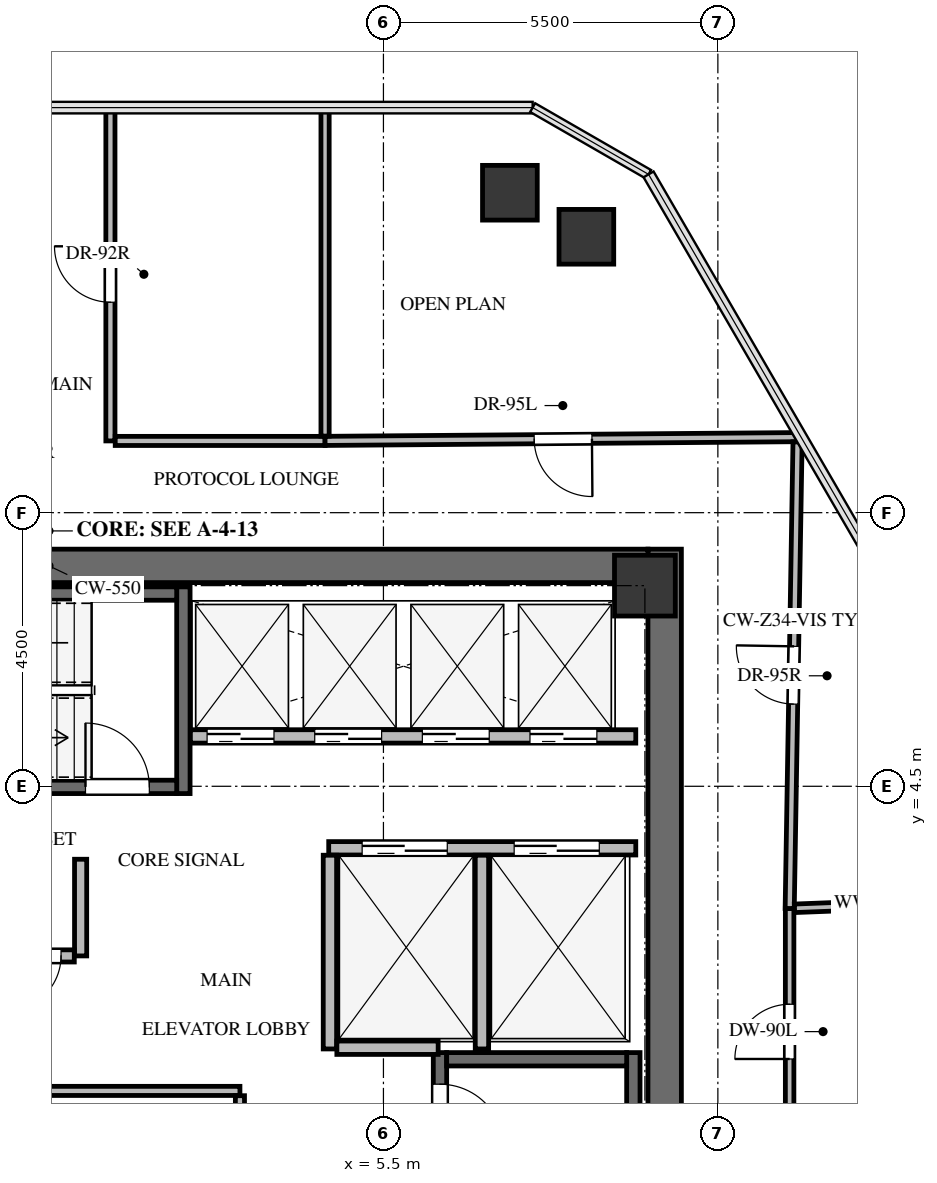
"""IFC4 building model, lengths in metres.
Left out: names, types, materials, properties, quantities, classifications, styles, units other than length and angle.
Written with IfcOpenShell. Run it as: python <this file> out.ifc"""

import sys

from ifc_helpers import new_model, si_unit, direction, frame, frame_2d, origin, origin_2d, place, context, subcontext, project, spatial, rectangle, extrude, source, transform, mapped, element, fill, save


model = new_model("IFC4")
c1 = context("Model", 3, precision=1e-05, world=origin(), true_north=direction((0.0, 1.0)))
c2 = subcontext(c1, "Body", "Model", "MODEL_VIEW")
j1 = project(units=[si_unit("LENGTHUNIT", "METRE"), si_unit("PLANEANGLEUNIT", "RADIAN")], contexts=[c1])
p1 = place(None, origin())
s1 = spatial("IfcSite", under=j1, at=p1, CompositionType="ELEMENT")
p2 = place(p1, origin())
s2 = spatial("IfcBuilding", under=s1, at=p2, CompositionType="ELEMENT")
p3 = place(p2, frame((0.0, 0.0, 234.8)))
s3 = spatial("IfcBuildingStorey", under=s2, at=p3, CompositionType="ELEMENT", Elevation=234.8)
p4 = place(p3, frame((10.125, -8.4, 0.0), z_axis=(0.0, 0.0, 1.0), x_axis=(0.0, 1.0, 0.0)))
e1 = element("IfcWall", 1, at=p4, inside=s3, PredefinedType="SHEAR", context=c2, shape_type="SweptSolid", body=[
    extrude(rectangle(XDim=16.8, YDim=0.55, at=frame_2d((8.4, 0.0))), origin(), (0.0, 0.0, 1.0), 3.3),
])
p5 = place(p3, frame((-9.85, 8.125, 0.0), z_axis=(0.0, 0.0, 1.0), x_axis=(1.0, 0.0, 0.0)))
e2 = element("IfcWall", 2, at=p5, inside=s3, PredefinedType="SHEAR", context=c2, shape_type="SweptSolid", body=[
    extrude(rectangle(XDim=19.7, YDim=0.55, at=frame_2d((9.85, 0.0))), origin(), (0.0, 0.0, 1.0), 3.3),
])
p6 = place(p3, frame((9.61, -7.77, -0.24), z_axis=(0.0, 0.0, 1.0), x_axis=(0.0, 1.0, 0.0)))
e3 = element("IfcWall", 3, at=p6, inside=s3, PredefinedType="SHEAR", context=c2, shape_type="SweptSolid", body=[
    extrude(rectangle(XDim=7.89, YDim=0.22, at=frame_2d((3.945, 0.0))), origin(), (0.0, 0.0, 1.0), 3.3),
])
p7 = place(p3, frame((6.43, 0.12, -0.24), z_axis=(0.0, 0.0, 1.0), x_axis=(0.0, -1.0, 0.0)))
e4 = element("IfcWall", 4, at=p7, inside=s3, PredefinedType="SHEAR", context=c2, shape_type="SweptSolid", body=[
    extrude(rectangle(XDim=7.89, YDim=0.22, at=frame_2d((3.945, 0.0))), origin(), (0.0, 0.0, 1.0), 3.3),
])
p8 = place(p7, frame((0.52, 0.0, 0.0)))
e5 = element("IfcOpeningElement", 5, at=p8, cuts=e4, PredefinedType="OPENING", context=c2, shape_type="SweptSolid", body=[
    extrude(rectangle(XDim=1.05, YDim=2.15, at=frame_2d((0.525, 1.075))), frame((0.0, 0.12, 0.0), z_axis=(0.0, -1.0, 0.0), x_axis=(1.0, 0.0, 0.0)), (0.0, 0.0, 1.0), 0.24),
])
p9 = place(p3, frame((9.5, 0.01, -0.24), z_axis=(0.0, 0.0, 1.0), x_axis=(-1.0, 0.0, 0.0)))
e6 = element("IfcWall", 6, at=p9, inside=s3, PredefinedType="SHEAR", context=c2, shape_type="SweptSolid", body=[
    extrude(rectangle(XDim=2.96, YDim=0.22, at=frame_2d((1.48, 0.0))), origin(), (0.0, 0.0, 1.0), 3.3),
])
p10 = place(p3, frame((2.21, 4.38, -0.24), z_axis=(0.0, 0.0, 1.0), x_axis=(0.0, 1.0, 0.0)))
e7 = element("IfcWall", 7, at=p10, inside=s3, PredefinedType="SHEAR", context=c2, shape_type="SweptSolid", body=[
    extrude(rectangle(XDim=3.4, YDim=0.22, at=frame_2d((1.7, 0.0))), origin(), (0.0, 0.0, 1.0), 3.3),
])
p11 = place(p3, frame((-5.25, 4.49, -0.24), z_axis=(0.0, 0.0, 1.0), x_axis=(1.0, 0.0, 0.0)))
e8 = element("IfcWall", 8, at=p11, inside=s3, PredefinedType="SHEAR", context=c2, shape_type="SweptSolid", body=[
    extrude(rectangle(XDim=7.35, YDim=0.22, at=frame_2d((3.675, 0.0))), origin(), (0.0, 0.0, 1.0), 3.3),
])
p12 = place(p11, frame((5.85, 0.0, 0.0)))
e9 = element("IfcOpeningElement", 9, at=p12, cuts=e8, PredefinedType="OPENING", context=c2, shape_type="SweptSolid", body=[
    extrude(rectangle(XDim=1.05, YDim=2.15, at=frame_2d((0.525, 1.075))), frame((0.0, 0.12, 0.0), z_axis=(0.0, -1.0, 0.0), x_axis=(1.0, 0.0, 0.0)), (0.0, 0.0, 1.0), 0.24),
])
p13 = place(p3, frame((2.1, 7.67, -0.24), z_axis=(0.0, 0.0, 1.0), x_axis=(-1.0, 0.0, 0.0)))
e10 = element("IfcWall", 10, at=p13, inside=s3, PredefinedType="SHEAR", context=c2, shape_type="SweptSolid", body=[
    extrude(rectangle(XDim=7.35, YDim=0.22, at=frame_2d((3.675, 0.0))), origin(), (0.0, 0.0, 1.0), 3.3),
])
m1 = source(origin(), c2, "Body", "SweptSolid", [
    extrude(rectangle(XDim=1.0, YDim=1.0, at=origin_2d()), origin(), (0.0, 0.0, 1.0), 3.3),
])
p14 = place(p3, frame((9.8, 7.8, -0.24), z_axis=(0.0, 0.0, 1.0), x_axis=(1.0, 0.0, 0.0)))
e11 = element("IfcColumn", 11, at=p14, inside=s3, PredefinedType="COLUMN", context=c2, shape_type="MappedRepresentation", body=[
    mapped(m1, transform((0.0, 0.0, 0.0), x_axis=(1.0, 0.0, 0.0), y_axis=(0.0, 1.0, 0.0), z_axis=(0.0, 0.0, 1.0), scale=1.0)),
])
m2 = source(origin(), c2, "Body", "SweptSolid", [
    extrude(rectangle(XDim=0.9, YDim=0.9, at=origin_2d()), origin(), (0.0, 0.0, 1.0), 3.3),
])
for number, where, z_axis, x_axis in (
    (12, (7.58, 14.262, -0.24), (0.0, 0.0, 1.0), (1.0, 0.0, 0.0)),
    (13, (8.837, 13.538, -0.24), (0.0, 0.0, 1.0), (1.0, 0.0, 0.0)),
):
    element("IfcColumn", number, at=place(p3, frame(where, z_axis=z_axis, x_axis=x_axis)), inside=s3, PredefinedType="COLUMN", context=c2, shape_type="MappedRepresentation", body=[
        mapped(m2, transform((0.0, 0.0, 0.0), x_axis=(1.0, 0.0, 0.0), y_axis=(0.0, 1.0, 0.0), z_axis=(0.0, 0.0, 1.0), scale=1.0)),
    ])
p15 = place(p3, frame((4.6, 3.48, 0.0), z_axis=(0.0, 0.0, 1.0), x_axis=(1.0, 0.0, 0.0)))
e14 = element("IfcWall", 14, at=p15, inside=s3, PredefinedType="SOLIDWALL", context=c2, shape_type="SweptSolid", body=[
    extrude(rectangle(XDim=5.05, YDim=0.22, at=frame_2d((2.525, 0.0))), origin(), (0.0, 0.0, 1.0), 3.045),
])
p16 = place(p15, frame((0.55, 0.0, 0.0)))
e15 = element("IfcOpeningElement", 15, at=p16, cuts=e14, PredefinedType="OPENING", context=c2, shape_type="SweptSolid", body=[
    extrude(rectangle(XDim=1.4, YDim=2.15, at=frame_2d((0.7, 1.075))), frame((0.0, 0.12, 0.0), z_axis=(0.0, -1.0, 0.0), x_axis=(1.0, 0.0, 0.0)), (0.0, 0.0, 1.0), 0.24),
])
p17 = place(p15, frame((3.05, 0.0, 0.0)))
e16 = element("IfcOpeningElement", 16, at=p17, cuts=e14, PredefinedType="OPENING", context=c2, shape_type="SweptSolid", body=[
    extrude(rectangle(XDim=1.4, YDim=2.15, at=frame_2d((0.7, 1.075))), frame((0.0, 0.12, 0.0), z_axis=(0.0, -1.0, 0.0), x_axis=(1.0, 0.0, 0.0)), (0.0, 0.0, 1.0), 0.24),
])
for number, where, z_axis, x_axis in (
    (17, (4.62, 0.18, 0.0), (0.0, 0.0, 1.0), (0.0, 1.0, 0.0)),
    (18, (7.12, 0.18, 0.0), (0.0, 0.0, 1.0), (0.0, 1.0, 0.0)),
):
    element("IfcWall", number, at=place(p3, frame(where, z_axis=z_axis, x_axis=x_axis)), inside=s3, PredefinedType="SOLIDWALL", context=c2, shape_type="SweptSolid", body=[
        extrude(rectangle(XDim=3.186, YDim=0.22, at=frame_2d((1.593, 0.0))), origin(), (0.0, 0.0, 1.0), 3.045),
    ])
p18 = place(p3, frame((4.734, 0.2, 0.0), z_axis=(0.0, 0.0, 1.0), x_axis=(1.0, 0.0, 0.0)))
e19 = element("IfcWall", 19, at=p18, inside=s3, PredefinedType="SOLIDWALL", context=c2, shape_type="SweptSolid", body=[
    extrude(rectangle(XDim=1.666, YDim=0.22, at=frame_2d((0.833, 0.0))), origin(), (0.0, 0.0, 1.0), 3.045),
])
p19 = place(p3, frame((2.325, 5.32, 0.0), z_axis=(0.0, 0.0, 1.0), x_axis=(1.0, 0.0, 0.0)))
e20 = element("IfcWall", 20, at=p19, inside=s3, PredefinedType="SOLIDWALL", context=c2, shape_type="SweptSolid", body=[
    extrude(rectangle(XDim=7.325, YDim=0.22, at=frame_2d((3.663, 0.0))), origin(), (0.0, 0.0, 1.0), 3.045),
])
p20 = place(p19, frame((0.275, 0.0, 0.0)))
e21 = element("IfcOpeningElement", 21, at=p20, cuts=e20, PredefinedType="OPENING", context=c2, shape_type="SweptSolid", body=[
    extrude(rectangle(XDim=1.1, YDim=2.15, at=frame_2d((0.55, 1.075))), frame((0.0, 0.12, 0.0), z_axis=(0.0, -1.0, 0.0), x_axis=(1.0, 0.0, 0.0)), (0.0, 0.0, 1.0), 0.24),
])
p21 = place(p19, frame((2.045, 0.0, 0.0)))
e22 = element("IfcOpeningElement", 22, at=p21, cuts=e20, PredefinedType="OPENING", context=c2, shape_type="SweptSolid", body=[
    extrude(rectangle(XDim=1.1, YDim=2.15, at=frame_2d((0.55, 1.075))), frame((0.0, 0.12, 0.0), z_axis=(0.0, -1.0, 0.0), x_axis=(1.0, 0.0, 0.0)), (0.0, 0.0, 1.0), 0.24),
])
p22 = place(p19, frame((3.815, 0.0, 0.0)))
e23 = element("IfcOpeningElement", 23, at=p22, cuts=e20, PredefinedType="OPENING", context=c2, shape_type="SweptSolid", body=[
    extrude(rectangle(XDim=1.1, YDim=2.15, at=frame_2d((0.55, 1.075))), frame((0.0, 0.12, 0.0), z_axis=(0.0, -1.0, 0.0), x_axis=(1.0, 0.0, 0.0)), (0.0, 0.0, 1.0), 0.24),
])
p23 = place(p19, frame((5.585, 0.0, 0.0)))
e24 = element("IfcOpeningElement", 24, at=p23, cuts=e20, PredefinedType="OPENING", context=c2, shape_type="SweptSolid", body=[
    extrude(rectangle(XDim=1.1, YDim=2.15, at=frame_2d((0.55, 1.075))), frame((0.0, 0.12, 0.0), z_axis=(0.0, -1.0, 0.0), x_axis=(1.0, 0.0, 0.0)), (0.0, 0.0, 1.0), 0.24),
])
p24 = place(p3, frame((-0.59, -0.51, 0.0), z_axis=(0.0, 0.0, 1.0), x_axis=(1.0, 0.0, 0.0)))
e25 = element("IfcWall", 25, at=p24, inside=s3, PredefinedType="PARTITIONING", context=c2, shape_type="SweptSolid", body=[
    extrude(rectangle(XDim=3.73, YDim=0.15, at=frame_2d((1.865, 0.0))), origin(), (0.0, 0.0, 1.0), 3.045),
])
p25 = place(p3, frame((3.14, -0.589, 0.0), z_axis=(0.0, 0.0, 1.0), x_axis=(0.0, -1.0, 0.0)))
e26 = element("IfcWall", 26, at=p25, inside=s3, PredefinedType="PARTITIONING", context=c2, shape_type="SweptSolid", body=[
    extrude(rectangle(XDim=2.372, YDim=0.15, at=frame_2d((1.186, 0.0))), origin(), (0.0, 0.0, 1.0), 3.045),
])
p26 = place(p3, frame((0.52, 3.3, 0.0), z_axis=(0.0, 0.0, 1.0), x_axis=(0.0, -1.0, 0.0)))
e27 = element("IfcWall", 27, at=p26, inside=s3, PredefinedType="SOLIDWALL", context=c2, shape_type="SweptSolid", body=[
    extrude(rectangle(XDim=1.59, YDim=0.2, at=frame_2d((0.795, 0.0))), origin(), (0.0, 0.0, 1.0), 3.045),
])
p27 = place(p3, frame((0.416, 1.71, 0.0), z_axis=(0.0, 0.0, 1.0), x_axis=(-1.0, 0.0, 0.0)))
e28 = element("IfcWall", 28, at=p27, inside=s3, PredefinedType="SOLIDWALL", context=c2, shape_type="SweptSolid", body=[
    extrude(rectangle(XDim=1.336, YDim=0.2, at=frame_2d((0.668, 0.0))), origin(), (0.0, 0.0, 1.0), 3.045),
])
p28 = place(p27, frame((0.218, 0.0, 0.0)))
e29 = element("IfcOpeningElement", 29, at=p28, cuts=e28, PredefinedType="OPENING", context=c2, shape_type="SweptSolid", body=[
    extrude(rectangle(XDim=0.9, YDim=2.05, at=frame_2d((0.45, 1.025))), frame((0.0, 0.11, 0.0), z_axis=(0.0, -1.0, 0.0), x_axis=(1.0, 0.0, 0.0)), (0.0, 0.0, 1.0), 0.22),
])
p29 = place(p3, frame((12.18, -1.56, 0.0), z_axis=(0.0, 0.0, 1.0), x_axis=(0.0, 1.0, 0.0)))
e30 = element("IfcWall", 30, at=p29, inside=s3, PredefinedType="PARTITIONING", context=c2, shape_type="SweptSolid", body=[
    extrude(rectangle(XDim=4.05, YDim=0.14, at=frame_2d((2.025, 0.0))), origin(), (0.0, 0.0, 1.0), 2.301),
])
p30 = place(p29, frame((1.575, 0.0, 0.0)))
e31 = element("IfcOpeningElement", 31, at=p30, cuts=e30, PredefinedType="OPENING", context=c2, shape_type="SweptSolid", body=[
    extrude(rectangle(XDim=0.9, YDim=2.05, at=frame_2d((0.45, 1.025))), frame((0.0, 0.08, 0.0), z_axis=(0.0, -1.0, 0.0), x_axis=(1.0, 0.0, 0.0)), (0.0, 0.0, 1.0), 0.16),
])
p31 = place(p3, frame((1.01, 10.18, 0.0), z_axis=(0.0, 0.0, 1.0), x_axis=(0.0, 1.0, 0.0)))
e32 = element("IfcWall", 32, at=p31, inside=s3, PredefinedType="PARTITIONING", context=c2, shape_type="SweptSolid", body=[
    extrude(rectangle(XDim=5.482, YDim=0.15, at=frame_2d((2.741, 0.0))), origin(), (0.0, 0.0, 1.0), 2.399),
])
p32 = place(p31, frame((2.281, 0.0, 0.0)))
e33 = element("IfcOpeningElement", 33, at=p32, cuts=e32, PredefinedType="OPENING", context=c2, shape_type="SweptSolid", body=[
    extrude(rectangle(XDim=0.92, YDim=2.1, at=frame_2d((0.46, 1.05))), frame((0.0, 0.085, 0.0), z_axis=(0.0, -1.0, 0.0), x_axis=(1.0, 0.0, 0.0)), (0.0, 0.0, 1.0), 0.17),
])
p33 = place(p3, frame((4.54, 10.18, 0.0), z_axis=(0.0, 0.0, 1.0), x_axis=(-1.0, 0.0, 0.0)))
e34 = element("IfcWall", 34, at=p33, inside=s3, PredefinedType="PARTITIONING", context=c2, shape_type="SweptSolid", body=[
    extrude(rectangle(XDim=3.451, YDim=0.15, at=frame_2d((1.726, 0.0))), origin(), (0.0, 0.0, 1.0), 3.045),
])
p34 = place(p3, frame((12.368, 10.243, 0.0), z_axis=(0.0, 0.0, 1.0), x_axis=(-0.999968379606, -0.007952344825, 0.0)))
e35 = element("IfcWall", 35, at=p34, inside=s3, PredefinedType="PARTITIONING", context=c2, shape_type="SweptSolid", body=[
    extrude(rectangle(XDim=7.829, YDim=0.15, at=frame_2d((3.914, 0.0))), origin(), (0.0, 0.0, 1.0), 2.301),
])
p35 = place(p34, frame((3.439, 0.0, 0.0)))
e36 = element("IfcOpeningElement", 36, at=p35, cuts=e35, PredefinedType="OPENING", context=c2, shape_type="SweptSolid", body=[
    extrude(rectangle(XDim=0.95, YDim=2.1, at=frame_2d((0.475, 1.05))), frame((0.0, 0.085, 0.0), z_axis=(0.0, -1.0, 0.0), x_axis=(1.0, 0.0, 0.0)), (0.0, 0.0, 1.0), 0.17),
])
p36 = place(p3, frame((12.181, 2.49, 0.0), z_axis=(0.0, 0.0, 1.0), x_axis=(0.016828669653, 0.999858387912, 0.0)))
e37 = element("IfcWall", 37, at=p36, inside=s3, PredefinedType="PARTITIONING", context=c2, shape_type="SweptSolid", body=[
    extrude(rectangle(XDim=7.674, YDim=0.15, at=frame_2d((3.837, 0.0))), origin(), (0.0, 0.0, 1.0), 2.399),
])
p37 = place(p36, frame((3.362, 0.0, 0.0)))
e38 = element("IfcOpeningElement", 38, at=p37, cuts=e37, PredefinedType="OPENING", context=c2, shape_type="SweptSolid", body=[
    extrude(rectangle(XDim=0.95, YDim=2.1, at=frame_2d((0.475, 1.05))), frame((0.0, 0.085, 0.0), z_axis=(0.0, -1.0, 0.0), x_axis=(1.0, 0.0, 0.0)), (0.0, 0.0, 1.0), 0.17),
])
p38 = place(p3, frame((12.26, 2.493, 0.0), z_axis=(0.0, 0.0, 1.0), x_axis=(0.999256206289, 0.038562082324, 0.0)))
e39 = element("IfcWall", 39, at=p38, inside=s3, PredefinedType="PARTITIONING", context=c2, shape_type="SweptSolid", body=[
    extrude(rectangle(XDim=4.508, YDim=0.14, at=frame_2d((2.254, 0.0))), origin(), (0.0, 0.0, 1.0), 2.399),
])
p39 = place(p3, frame((4.54, 15.662, 0.0), z_axis=(0.0, 0.0, 1.0), x_axis=(0.0, -1.0, 0.0)))
e40 = element("IfcWall", 40, at=p39, inside=s3, PredefinedType="PARTITIONING", context=c2, shape_type="SweptSolid", body=[
    extrude(rectangle(XDim=5.403, YDim=0.135, at=frame_2d((2.701, 0.0))), origin(), (0.0, 0.0, 1.0), 2.399),
])
m3 = source(origin(), c2, "Body", "SweptSolid", [
    extrude(rectangle(XDim=1.05, YDim=2.15, at=frame_2d((0.525, 1.075))), frame((0.0, 0.025, 0.0), z_axis=(0.0, -1.0, 0.0), x_axis=(1.0, 0.0, 0.0)), (0.0, 0.0, 1.0), 0.05),
])
p40 = place(p8, origin())
e41 = element("IfcDoor", 41, at=p40, inside=s3, OperationType="SINGLE_SWING_RIGHT", PredefinedType="DOOR", context=c2, shape_type="MappedRepresentation", body=[
    mapped(m3, transform((0.0, 0.0, 0.0), x_axis=(1.0, 0.0, 0.0), y_axis=(0.0, 1.0, 0.0), z_axis=(0.0, 0.0, 1.0), scale=1.0)),
])
fill(e5, e41)
m4 = source(origin(), c2, "Body", "SweptSolid", [
    extrude(rectangle(XDim=1.05, YDim=2.15, at=frame_2d((0.525, 1.075))), frame((0.0, 0.025, 0.0), z_axis=(0.0, -1.0, 0.0), x_axis=(1.0, 0.0, 0.0)), (0.0, 0.0, 1.0), 0.05),
])
p41 = place(p12, origin())
e42 = element("IfcDoor", 42, at=p41, inside=s3, OperationType="SINGLE_SWING_LEFT", PredefinedType="DOOR", context=c2, shape_type="MappedRepresentation", body=[
    mapped(m4, transform((0.0, 0.0, 0.0), x_axis=(1.0, 0.0, 0.0), y_axis=(0.0, 1.0, 0.0), z_axis=(0.0, 0.0, 1.0), scale=1.0)),
])
fill(e9, e42)
m5 = source(origin(), c2, "Body", "SweptSolid", [
    extrude(rectangle(XDim=1.4, YDim=2.15, at=frame_2d((0.7, 1.075))), frame((0.0, 0.025, 0.0), z_axis=(0.0, -1.0, 0.0), x_axis=(1.0, 0.0, 0.0)), (0.0, 0.0, 1.0), 0.05),
])
p42 = place(p16, origin())
e43 = element("IfcDoor", 43, at=p42, inside=s3, OperationType="DOUBLE_DOOR_SLIDING", PredefinedType="DOOR", context=c2, shape_type="MappedRepresentation", body=[
    mapped(m5, transform((0.0, 0.0, 0.0), x_axis=(1.0, 0.0, 0.0), y_axis=(0.0, 1.0, 0.0), z_axis=(0.0, 0.0, 1.0), scale=1.0)),
])
fill(e15, e43)
p43 = place(p17, origin())
e44 = element("IfcDoor", 44, at=p43, inside=s3, OperationType="DOUBLE_DOOR_SLIDING", PredefinedType="DOOR", context=c2, shape_type="MappedRepresentation", body=[
    mapped(m5, transform((0.0, 0.0, 0.0), x_axis=(1.0, 0.0, 0.0), y_axis=(0.0, 1.0, 0.0), z_axis=(0.0, 0.0, 1.0), scale=1.0)),
])
fill(e16, e44)
m6 = source(origin(), c2, "Body", "SweptSolid", [
    extrude(rectangle(XDim=1.1, YDim=2.15, at=frame_2d((0.55, 1.075))), frame((0.0, 0.025, 0.0), z_axis=(0.0, -1.0, 0.0), x_axis=(1.0, 0.0, 0.0)), (0.0, 0.0, 1.0), 0.05),
])
p44 = place(p20, origin())
e45 = element("IfcDoor", 45, at=p44, inside=s3, OperationType="DOUBLE_DOOR_SLIDING", PredefinedType="DOOR", context=c2, shape_type="MappedRepresentation", body=[
    mapped(m6, transform((0.0, 0.0, 0.0), x_axis=(1.0, 0.0, 0.0), y_axis=(0.0, 1.0, 0.0), z_axis=(0.0, 0.0, 1.0), scale=1.0)),
])
fill(e21, e45)
p45 = place(p21, origin())
e46 = element("IfcDoor", 46, at=p45, inside=s3, OperationType="DOUBLE_DOOR_SLIDING", PredefinedType="DOOR", context=c2, shape_type="MappedRepresentation", body=[
    mapped(m6, transform((0.0, 0.0, 0.0), x_axis=(1.0, 0.0, 0.0), y_axis=(0.0, 1.0, 0.0), z_axis=(0.0, 0.0, 1.0), scale=1.0)),
])
fill(e22, e46)
p46 = place(p22, origin())
e47 = element("IfcDoor", 47, at=p46, inside=s3, OperationType="DOUBLE_DOOR_SLIDING", PredefinedType="DOOR", context=c2, shape_type="MappedRepresentation", body=[
    mapped(m6, transform((0.0, 0.0, 0.0), x_axis=(1.0, 0.0, 0.0), y_axis=(0.0, 1.0, 0.0), z_axis=(0.0, 0.0, 1.0), scale=1.0)),
])
fill(e23, e47)
p47 = place(p23, origin())
e48 = element("IfcDoor", 48, at=p47, inside=s3, OperationType="DOUBLE_DOOR_SLIDING", PredefinedType="DOOR", context=c2, shape_type="MappedRepresentation", body=[
    mapped(m6, transform((0.0, 0.0, 0.0), x_axis=(1.0, 0.0, 0.0), y_axis=(0.0, 1.0, 0.0), z_axis=(0.0, 0.0, 1.0), scale=1.0)),
])
fill(e24, e48)
m7 = source(origin(), c2, "Body", "SweptSolid", [
    extrude(rectangle(XDim=0.9, YDim=2.05, at=frame_2d((0.45, 1.025))), frame((0.0, 0.025, 0.0), z_axis=(0.0, -1.0, 0.0), x_axis=(1.0, 0.0, 0.0)), (0.0, 0.0, 1.0), 0.05),
])
p48 = place(p28, origin())
e49 = element("IfcDoor", 49, at=p48, inside=s3, OperationType="SINGLE_SWING_RIGHT", PredefinedType="DOOR", context=c2, shape_type="MappedRepresentation", body=[
    mapped(m7, transform((0.0, 0.0, 0.0), x_axis=(1.0, 0.0, 0.0), y_axis=(0.0, 1.0, 0.0), z_axis=(0.0, 0.0, 1.0), scale=1.0)),
])
fill(e29, e49)
m8 = source(origin(), c2, "Body", "SweptSolid", [
    extrude(rectangle(XDim=0.9, YDim=2.05, at=frame_2d((0.45, 1.025))), frame((0.0, 0.025, 0.0), z_axis=(0.0, -1.0, 0.0), x_axis=(1.0, 0.0, 0.0)), (0.0, 0.0, 1.0), 0.05),
])
p49 = place(p30, origin())
e50 = element("IfcDoor", 50, at=p49, inside=s3, OperationType="SINGLE_SWING_LEFT", PredefinedType="DOOR", context=c2, shape_type="MappedRepresentation", body=[
    mapped(m8, transform((0.0, 0.0, 0.0), x_axis=(1.0, 0.0, 0.0), y_axis=(0.0, 1.0, 0.0), z_axis=(0.0, 0.0, 1.0), scale=1.0)),
])
fill(e31, e50)
m9 = source(origin(), c2, "Body", "SweptSolid", [
    extrude(rectangle(XDim=0.92, YDim=2.1, at=frame_2d((0.46, 1.05))), frame((0.0, 0.025, 0.0), z_axis=(0.0, -1.0, 0.0), x_axis=(1.0, 0.0, 0.0)), (0.0, 0.0, 1.0), 0.05),
])
p50 = place(p32, origin())
e51 = element("IfcDoor", 51, at=p50, inside=s3, OperationType="SINGLE_SWING_RIGHT", PredefinedType="DOOR", context=c2, shape_type="MappedRepresentation", body=[
    mapped(m9, transform((0.0, 0.0, 0.0), x_axis=(1.0, 0.0, 0.0), y_axis=(0.0, 1.0, 0.0), z_axis=(0.0, 0.0, 1.0), scale=1.0)),
])
fill(e33, e51)
m10 = source(origin(), c2, "Body", "SweptSolid", [
    extrude(rectangle(XDim=0.95, YDim=2.1, at=frame_2d((0.475, 1.05))), frame((0.0, 0.025, 0.0), z_axis=(0.0, -1.0, 0.0), x_axis=(1.0, 0.0, 0.0)), (0.0, 0.0, 1.0), 0.05),
])
p51 = place(p35, origin())
e52 = element("IfcDoor", 52, at=p51, inside=s3, OperationType="SINGLE_SWING_LEFT", PredefinedType="DOOR", context=c2, shape_type="MappedRepresentation", body=[
    mapped(m10, transform((0.0, 0.0, 0.0), x_axis=(1.0, 0.0, 0.0), y_axis=(0.0, 1.0, 0.0), z_axis=(0.0, 0.0, 1.0), scale=1.0)),
])
fill(e36, e52)
m11 = source(origin(), c2, "Body", "SweptSolid", [
    extrude(rectangle(XDim=0.95, YDim=2.1, at=frame_2d((0.475, 1.05))), frame((0.0, 0.025, 0.0), z_axis=(0.0, -1.0, 0.0), x_axis=(1.0, 0.0, 0.0)), (0.0, 0.0, 1.0), 0.05),
])
p52 = place(p37, origin())
e53 = element("IfcDoor", 53, at=p52, inside=s3, OperationType="SINGLE_SWING_RIGHT", PredefinedType="DOOR", context=c2, shape_type="MappedRepresentation", body=[
    mapped(m11, transform((0.0, 0.0, 0.0), x_axis=(1.0, 0.0, 0.0), y_axis=(0.0, 1.0, 0.0), z_axis=(0.0, 0.0, 1.0), scale=1.0)),
])
fill(e38, e53)
save(model, sys.argv[1])
